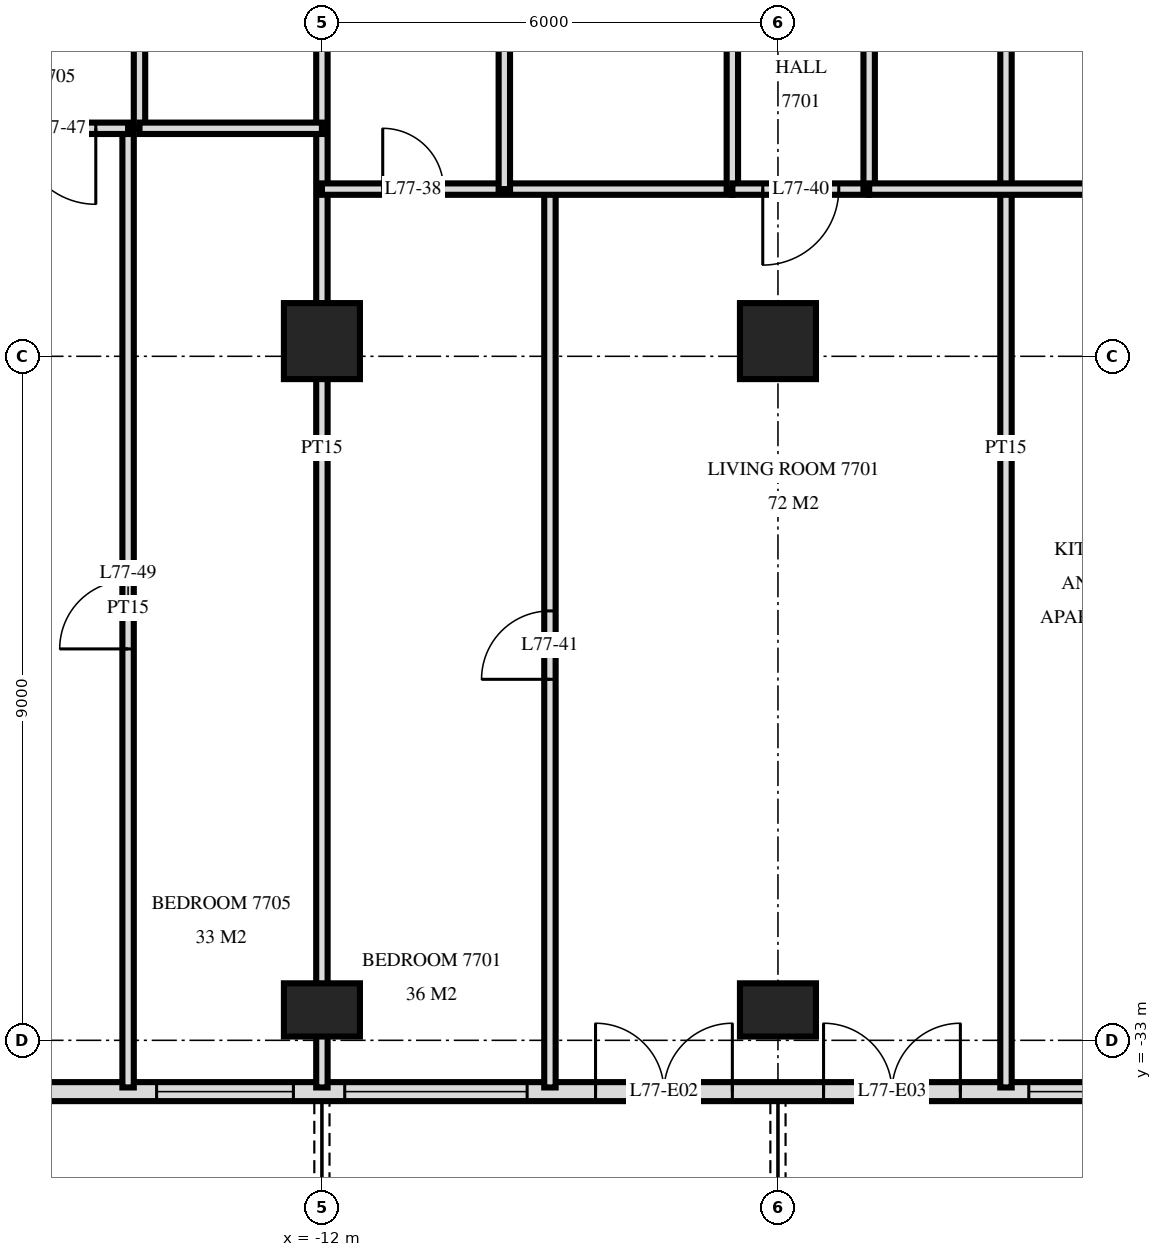
"""IFC4 building model, lengths in metres.
Left out: names, types, materials, properties, quantities, classifications, styles, units other than length and angle.
Written with IfcOpenShell. Run it as: python <this file> out.ifc"""

import sys

from ifc_helpers import new_model, si_unit, direction, frame, frame_2d, origin, origin_2d, place, context, subcontext, project, spatial, rectangle, extrude, element, fill, save


model = new_model("IFC4")
c1 = context("Model", 3, precision=1e-05, world=origin(), true_north=direction((0.0, 1.0)))
c2 = subcontext(c1, "Body", "Model", "MODEL_VIEW")
j1 = project(units=[si_unit("LENGTHUNIT", "METRE"), si_unit("PLANEANGLEUNIT", "RADIAN")], contexts=[c1])
p1 = place(None, origin())
s1 = spatial("IfcSite", under=j1, at=p1, CompositionType="ELEMENT")
p2 = place(p1, origin())
s2 = spatial("IfcBuilding", under=s1, at=p2, CompositionType="ELEMENT")
p3 = place(p2, frame((0.0, 0.0, 291.1)))
s3 = spatial("IfcBuildingStorey", under=s2, at=p3, CompositionType="ELEMENT", Elevation=291.1)
p4 = place(p3, frame((-12.0, -32.6, 0.0), z_axis=(0.0, 0.0, 1.0), x_axis=(1.0, 0.0, 0.0)))
e1 = element("IfcColumn", 1, at=p4, inside=s3, PredefinedType="COLUMN", context=c2, shape_type="SweptSolid", body=[
    extrude(rectangle(XDim=1.0, YDim=0.7, at=origin_2d()), origin(), (0.0, 0.0, 1.0), 3.5),
])
p5 = place(p3, frame((-12.0, -23.8, 0.0), z_axis=(0.0, 0.0, 1.0), x_axis=(1.0, 0.0, 0.0)))
e2 = element("IfcColumn", 2, at=p5, inside=s3, PredefinedType="COLUMN", context=c2, shape_type="SweptSolid", body=[
    extrude(rectangle(XDim=1.0, YDim=1.0, at=origin_2d()), origin(), (0.0, 0.0, 1.0), 3.5),
])
p6 = place(p3, frame((-6.0, -32.6, 0.0), z_axis=(0.0, 0.0, 1.0), x_axis=(1.0, 0.0, 0.0)))
e3 = element("IfcColumn", 3, at=p6, inside=s3, PredefinedType="COLUMN", context=c2, shape_type="SweptSolid", body=[
    extrude(rectangle(XDim=1.0, YDim=0.7, at=origin_2d()), origin(), (0.0, 0.0, 1.0), 3.5),
])
p7 = place(p3, frame((-6.0, -23.8, 0.0), z_axis=(0.0, 0.0, 1.0), x_axis=(1.0, 0.0, 0.0)))
e4 = element("IfcColumn", 4, at=p7, inside=s3, PredefinedType="COLUMN", context=c2, shape_type="SweptSolid", body=[
    extrude(rectangle(XDim=1.0, YDim=1.0, at=origin_2d()), origin(), (0.0, 0.0, 1.0), 3.5),
])
p8 = place(p3, frame((-18.575, -33.675, 0.0), z_axis=(0.0, 0.0, 1.0), x_axis=(1.0, 0.0, 0.0)))
e5 = element("IfcWall", 5, at=p8, inside=s3, PredefinedType="SOLIDWALL", context=c2, shape_type="SweptSolid", body=[
    extrude(rectangle(XDim=37.151, YDim=0.25, at=frame_2d((18.575, 0.0))), origin(), (0.0, 0.0, 1.0), 3.22),
])
p9 = place(p8, frame((1.175, 0.0, 0.0)))
e6 = element("IfcOpeningElement", 6, at=p9, cuts=e5, PredefinedType="OPENING", context=c2, shape_type="SweptSolid", body=[
    extrude(rectangle(XDim=1.8, YDim=2.4, at=frame_2d((0.9, 1.2))), frame((0.0, 0.135, 0.0), z_axis=(0.0, -1.0, 0.0), x_axis=(1.0, 0.0, 0.0)), (0.0, 0.0, 1.0), 0.27),
])
p10 = place(p8, frame((4.4, 0.0, 0.9)))
e7 = element("IfcOpeningElement", 7, at=p10, cuts=e5, PredefinedType="OPENING", context=c2, shape_type="SweptSolid", body=[
    extrude(rectangle(XDim=1.8, YDim=1.5, at=frame_2d((0.9, 0.75))), frame((0.0, 0.135, 0.0), z_axis=(0.0, -1.0, 0.0), x_axis=(1.0, 0.0, 0.0)), (0.0, 0.0, 1.0), 0.27),
])
p11 = place(p8, frame((6.875, 0.0, 0.9)))
e8 = element("IfcOpeningElement", 8, at=p11, cuts=e5, PredefinedType="OPENING", context=c2, shape_type="SweptSolid", body=[
    extrude(rectangle(XDim=2.4, YDim=1.5, at=frame_2d((1.2, 0.75))), frame((0.0, 0.135, 0.0), z_axis=(0.0, -1.0, 0.0), x_axis=(1.0, 0.0, 0.0)), (0.0, 0.0, 1.0), 0.27),
])
p12 = place(p8, frame((10.175, 0.0, 0.0)))
e9 = element("IfcOpeningElement", 9, at=p12, cuts=e5, PredefinedType="OPENING", context=c2, shape_type="SweptSolid", body=[
    extrude(rectangle(XDim=1.8, YDim=2.4, at=frame_2d((0.9, 1.2))), frame((0.0, 0.135, 0.0), z_axis=(0.0, -1.0, 0.0), x_axis=(1.0, 0.0, 0.0)), (0.0, 0.0, 1.0), 0.27),
])
p13 = place(p8, frame((13.175, 0.0, 0.0)))
e10 = element("IfcOpeningElement", 10, at=p13, cuts=e5, PredefinedType="OPENING", context=c2, shape_type="SweptSolid", body=[
    extrude(rectangle(XDim=1.8, YDim=2.4, at=frame_2d((0.9, 1.2))), frame((0.0, 0.135, 0.0), z_axis=(0.0, -1.0, 0.0), x_axis=(1.0, 0.0, 0.0)), (0.0, 0.0, 1.0), 0.27),
])
p14 = place(p8, frame((15.875, 0.0, 0.9)))
e11 = element("IfcOpeningElement", 11, at=p14, cuts=e5, PredefinedType="OPENING", context=c2, shape_type="SweptSolid", body=[
    extrude(rectangle(XDim=2.4, YDim=1.5, at=frame_2d((1.2, 0.75))), frame((0.0, 0.135, 0.0), z_axis=(0.0, -1.0, 0.0), x_axis=(1.0, 0.0, 0.0)), (0.0, 0.0, 1.0), 0.27),
])
p15 = place(p8, frame((19.175, 0.0, 0.0)))
e12 = element("IfcOpeningElement", 12, at=p15, cuts=e5, PredefinedType="OPENING", context=c2, shape_type="SweptSolid", body=[
    extrude(rectangle(XDim=1.8, YDim=2.4, at=frame_2d((0.9, 1.2))), frame((0.0, 0.135, 0.0), z_axis=(0.0, -1.0, 0.0), x_axis=(1.0, 0.0, 0.0)), (0.0, 0.0, 1.0), 0.27),
])
p16 = place(p8, frame((21.875, 0.0, 0.9)))
e13 = element("IfcOpeningElement", 13, at=p16, cuts=e5, PredefinedType="OPENING", context=c2, shape_type="SweptSolid", body=[
    extrude(rectangle(XDim=2.4, YDim=1.5, at=frame_2d((1.2, 0.75))), frame((0.0, 0.135, 0.0), z_axis=(0.0, -1.0, 0.0), x_axis=(1.0, 0.0, 0.0)), (0.0, 0.0, 1.0), 0.27),
])
p17 = place(p8, frame((25.063, 0.0, 0.9)))
e14 = element("IfcOpeningElement", 14, at=p17, cuts=e5, PredefinedType="OPENING", context=c2, shape_type="SweptSolid", body=[
    extrude(rectangle(XDim=1.8, YDim=1.5, at=frame_2d((0.9, 0.75))), frame((0.0, 0.135, 0.0), z_axis=(0.0, -1.0, 0.0), x_axis=(1.0, 0.0, 0.0)), (0.0, 0.0, 1.0), 0.27),
])
p18 = place(p8, frame((27.838, 0.0, 0.0)))
e15 = element("IfcOpeningElement", 15, at=p18, cuts=e5, PredefinedType="OPENING", context=c2, shape_type="SweptSolid", body=[
    extrude(rectangle(XDim=1.8, YDim=2.4, at=frame_2d((0.9, 1.2))), frame((0.0, 0.135, 0.0), z_axis=(0.0, -1.0, 0.0), x_axis=(1.0, 0.0, 0.0)), (0.0, 0.0, 1.0), 0.27),
])
p19 = place(p8, frame((31.175, 0.0, 0.0)))
e16 = element("IfcOpeningElement", 16, at=p19, cuts=e5, PredefinedType="OPENING", context=c2, shape_type="SweptSolid", body=[
    extrude(rectangle(XDim=1.8, YDim=2.4, at=frame_2d((0.9, 1.2))), frame((0.0, 0.135, 0.0), z_axis=(0.0, -1.0, 0.0), x_axis=(1.0, 0.0, 0.0)), (0.0, 0.0, 1.0), 0.27),
])
p20 = place(p3, frame((-3.0, -33.62, 0.0), z_axis=(0.0, 0.0, 1.0), x_axis=(0.0, 1.0, 0.0)))
e17 = element("IfcWall", 17, at=p20, inside=s3, PredefinedType="PARTITIONING", context=c2, shape_type="SweptSolid", body=[
    extrude(rectangle(XDim=16.82, YDim=0.15, at=frame_2d((8.41, 0.0))), origin(), (0.0, 0.0, 1.0), 3.22),
])
p21 = place(p3, frame((-4.8, -21.8, 0.0), z_axis=(0.0, 0.0, 1.0), x_axis=(0.0, 1.0, 0.0)))
e18 = element("IfcWall", 18, at=p21, inside=s3, PredefinedType="PARTITIONING", context=c2, shape_type="SweptSolid", body=[
    extrude(rectangle(XDim=5.0, YDim=0.15, at=frame_2d((2.5, 0.0))), origin(), (0.0, 0.0, 1.0), 3.22),
])
p22 = place(p3, frame((-6.6, -21.8, 0.0), z_axis=(0.0, 0.0, 1.0), x_axis=(0.0, 1.0, 0.0)))
e19 = element("IfcWall", 19, at=p22, inside=s3, PredefinedType="PARTITIONING", context=c2, shape_type="SweptSolid", body=[
    extrude(rectangle(XDim=5.0, YDim=0.15, at=frame_2d((2.5, 0.0))), origin(), (0.0, 0.0, 1.0), 3.22),
])
p23 = place(p22, frame((2.0, 0.0, 0.0)))
e20 = element("IfcOpeningElement", 20, at=p23, cuts=e19, PredefinedType="OPENING", context=c2, shape_type="SweptSolid", body=[
    extrude(rectangle(XDim=1.0, YDim=2.1, at=frame_2d((0.5, 1.05))), frame((0.0, 0.085, 0.0), z_axis=(0.0, -1.0, 0.0), x_axis=(1.0, 0.0, 0.0)), (0.0, 0.0, 1.0), 0.17),
])
p24 = place(p3, frame((-9.0, -33.62, 0.0), z_axis=(0.0, 0.0, 1.0), x_axis=(0.0, 1.0, 0.0)))
e21 = element("IfcWall", 21, at=p24, inside=s3, PredefinedType="PARTITIONING", context=c2, shape_type="SweptSolid", body=[
    extrude(rectangle(XDim=11.82, YDim=0.15, at=frame_2d((5.91, 0.0))), origin(), (0.0, 0.0, 1.0), 3.22),
])
p25 = place(p24, frame((5.37, 0.0, 0.0)))
e22 = element("IfcOpeningElement", 22, at=p25, cuts=e21, PredefinedType="OPENING", context=c2, shape_type="SweptSolid", body=[
    extrude(rectangle(XDim=0.9, YDim=2.1, at=frame_2d((0.45, 1.05))), frame((0.0, 0.085, 0.0), z_axis=(0.0, -1.0, 0.0), x_axis=(1.0, 0.0, 0.0)), (0.0, 0.0, 1.0), 0.17),
])
p26 = place(p3, frame((-9.6, -21.8, 0.0), z_axis=(0.0, 0.0, 1.0), x_axis=(0.0, 1.0, 0.0)))
e23 = element("IfcWall", 23, at=p26, inside=s3, PredefinedType="PARTITIONING", context=c2, shape_type="SweptSolid", body=[
    extrude(rectangle(XDim=5.0, YDim=0.15, at=frame_2d((2.5, 0.0))), origin(), (0.0, 0.0, 1.0), 3.22),
])
p27 = place(p3, frame((-12.0, -33.62, 0.0), z_axis=(0.0, 0.0, 1.0), x_axis=(0.0, 1.0, 0.0)))
e24 = element("IfcWall", 24, at=p27, inside=s3, PredefinedType="PARTITIONING", context=c2, shape_type="SweptSolid", body=[
    extrude(rectangle(XDim=16.82, YDim=0.15, at=frame_2d((8.41, 0.0))), origin(), (0.0, 0.0, 1.0), 3.22),
])
p28 = place(p3, frame((-14.4, -21.0, 0.0), z_axis=(0.0, 0.0, 1.0), x_axis=(0.0, 1.0, 0.0)))
e25 = element("IfcWall", 25, at=p28, inside=s3, PredefinedType="PARTITIONING", context=c2, shape_type="SweptSolid", body=[
    extrude(rectangle(XDim=4.2, YDim=0.15, at=frame_2d((2.1, 0.0))), origin(), (0.0, 0.0, 1.0), 3.22),
])
p29 = place(p28, frame((1.6, 0.0, 0.0)))
e26 = element("IfcOpeningElement", 26, at=p29, cuts=e25, PredefinedType="OPENING", context=c2, shape_type="SweptSolid", body=[
    extrude(rectangle(XDim=1.0, YDim=2.1, at=frame_2d((0.5, 1.05))), frame((0.0, 0.085, 0.0), z_axis=(0.0, -1.0, 0.0), x_axis=(1.0, 0.0, 0.0)), (0.0, 0.0, 1.0), 0.17),
])
p30 = place(p3, frame((-14.55, -33.62, 0.0), z_axis=(0.0, 0.0, 1.0), x_axis=(0.0, 1.0, 0.0)))
e27 = element("IfcWall", 27, at=p30, inside=s3, PredefinedType="PARTITIONING", context=c2, shape_type="SweptSolid", body=[
    extrude(rectangle(XDim=12.62, YDim=0.15, at=frame_2d((6.31, 0.0))), origin(), (0.0, 0.0, 1.0), 3.22),
])
p31 = place(p30, frame((5.77, 0.0, 0.0)))
e28 = element("IfcOpeningElement", 28, at=p31, cuts=e27, PredefinedType="OPENING", context=c2, shape_type="SweptSolid", body=[
    extrude(rectangle(XDim=0.9, YDim=2.1, at=frame_2d((0.45, 1.05))), frame((0.0, 0.085, 0.0), z_axis=(0.0, -1.0, 0.0), x_axis=(1.0, 0.0, 0.0)), (0.0, 0.0, 1.0), 0.17),
])
p32 = place(p3, frame((-6.6, -21.8, 0.0), z_axis=(0.0, 0.0, 1.0), x_axis=(1.0, 0.0, 0.0)))
e29 = element("IfcWall", 29, at=p32, inside=s3, PredefinedType="PARTITIONING", context=c2, shape_type="SweptSolid", body=[
    extrude(rectangle(XDim=1.8, YDim=0.15, at=frame_2d((0.9, 0.0))), origin(), (0.0, 0.0, 1.0), 3.22),
])
p33 = place(p32, frame((0.4, 0.0, 0.0)))
e30 = element("IfcOpeningElement", 30, at=p33, cuts=e29, PredefinedType="OPENING", context=c2, shape_type="SweptSolid", body=[
    extrude(rectangle(XDim=1.0, YDim=2.1, at=frame_2d((0.5, 1.05))), frame((0.0, 0.085, 0.0), z_axis=(0.0, -1.0, 0.0), x_axis=(1.0, 0.0, 0.0)), (0.0, 0.0, 1.0), 0.17),
])
p34 = place(p3, frame((-12.0, -21.8, 0.0), z_axis=(0.0, 0.0, 1.0), x_axis=(1.0, 0.0, 0.0)))
e31 = element("IfcWall", 31, at=p34, inside=s3, PredefinedType="PARTITIONING", context=c2, shape_type="SweptSolid", body=[
    extrude(rectangle(XDim=5.4, YDim=0.15, at=frame_2d((2.7, 0.0))), origin(), (0.0, 0.0, 1.0), 3.22),
])
p35 = place(p34, frame((0.8, 0.0, 0.0)))
e32 = element("IfcOpeningElement", 32, at=p35, cuts=e31, PredefinedType="OPENING", context=c2, shape_type="SweptSolid", body=[
    extrude(rectangle(XDim=0.8, YDim=2.1, at=frame_2d((0.4, 1.05))), frame((0.0, 0.085, 0.0), z_axis=(0.0, -1.0, 0.0), x_axis=(1.0, 0.0, 0.0)), (0.0, 0.0, 1.0), 0.17),
])
p36 = place(p3, frame((-4.8, -21.8, 0.0), z_axis=(0.0, 0.0, 1.0), x_axis=(1.0, 0.0, 0.0)))
e33 = element("IfcWall", 33, at=p36, inside=s3, PredefinedType="PARTITIONING", context=c2, shape_type="SweptSolid", body=[
    extrude(rectangle(XDim=3.5, YDim=0.15, at=frame_2d((1.75, 0.0))), origin(), (0.0, 0.0, 1.0), 3.22),
])
p37 = place(p3, frame((-16.4, -21.0, 0.0), z_axis=(0.0, 0.0, 1.0), x_axis=(1.0, 0.0, 0.0)))
e34 = element("IfcWall", 34, at=p37, inside=s3, PredefinedType="PARTITIONING", context=c2, shape_type="SweptSolid", body=[
    extrude(rectangle(XDim=1.85, YDim=0.15, at=frame_2d((0.925, 0.0))), origin(), (0.0, 0.0, 1.0), 3.22),
])
p38 = place(p37, frame((0.425, 0.0, 0.0)))
e35 = element("IfcOpeningElement", 35, at=p38, cuts=e34, PredefinedType="OPENING", context=c2, shape_type="SweptSolid", body=[
    extrude(rectangle(XDim=1.0, YDim=2.1, at=frame_2d((0.5, 1.05))), frame((0.0, 0.085, 0.0), z_axis=(0.0, -1.0, 0.0), x_axis=(1.0, 0.0, 0.0)), (0.0, 0.0, 1.0), 0.17),
])
p39 = place(p3, frame((-14.4, -21.0, 0.0), z_axis=(0.0, 0.0, 1.0), x_axis=(1.0, 0.0, 0.0)))
e36 = element("IfcWall", 36, at=p39, inside=s3, PredefinedType="PARTITIONING", context=c2, shape_type="SweptSolid", body=[
    extrude(rectangle(XDim=2.4, YDim=0.15, at=frame_2d((1.2, 0.0))), origin(), (0.0, 0.0, 1.0), 3.22),
])
p40 = place(p10, origin())
e37 = element("IfcWindow", 37, at=p40, inside=s3, PartitioningType="SINGLE_PANEL", PredefinedType="WINDOW", context=c2, shape_type="SweptSolid", body=[
    extrude(rectangle(XDim=1.8, YDim=1.5, at=frame_2d((0.9, 0.75))), frame((0.0, 0.03, 0.0), z_axis=(0.0, -1.0, 0.0), x_axis=(1.0, 0.0, 0.0)), (0.0, 0.0, 1.0), 0.06),
])
fill(e7, e37)
p41 = place(p11, origin())
e38 = element("IfcWindow", 38, at=p41, inside=s3, PartitioningType="SINGLE_PANEL", PredefinedType="WINDOW", context=c2, shape_type="SweptSolid", body=[
    extrude(rectangle(XDim=2.4, YDim=1.5, at=frame_2d((1.2, 0.75))), frame((0.0, 0.03, 0.0), z_axis=(0.0, -1.0, 0.0), x_axis=(1.0, 0.0, 0.0)), (0.0, 0.0, 1.0), 0.06),
])
fill(e8, e38)
p42 = place(p12, origin())
e39 = element("IfcDoor", 39, at=p42, inside=s3, OperationType="DOUBLE_DOOR_SINGLE_SWING", PredefinedType="DOOR", context=c2, shape_type="SweptSolid", body=[
    extrude(rectangle(XDim=1.8, YDim=2.4, at=frame_2d((0.9, 1.2))), frame((0.0, 0.025, 0.0), z_axis=(0.0, -1.0, 0.0), x_axis=(1.0, 0.0, 0.0)), (0.0, 0.0, 1.0), 0.05),
])
fill(e9, e39)
p43 = place(p13, origin())
e40 = element("IfcDoor", 40, at=p43, inside=s3, OperationType="DOUBLE_DOOR_SINGLE_SWING", PredefinedType="DOOR", context=c2, shape_type="SweptSolid", body=[
    extrude(rectangle(XDim=1.8, YDim=2.4, at=frame_2d((0.9, 1.2))), frame((0.0, 0.025, 0.0), z_axis=(0.0, -1.0, 0.0), x_axis=(1.0, 0.0, 0.0)), (0.0, 0.0, 1.0), 0.05),
])
fill(e10, e40)
p44 = place(p14, origin())
e41 = element("IfcWindow", 41, at=p44, inside=s3, PartitioningType="SINGLE_PANEL", PredefinedType="WINDOW", context=c2, shape_type="SweptSolid", body=[
    extrude(rectangle(XDim=2.4, YDim=1.5, at=frame_2d((1.2, 0.75))), frame((0.0, 0.03, 0.0), z_axis=(0.0, -1.0, 0.0), x_axis=(1.0, 0.0, 0.0)), (0.0, 0.0, 1.0), 0.06),
])
fill(e11, e41)
p45 = place(p35, origin())
e42 = element("IfcDoor", 42, at=p45, inside=s3, OperationType="SINGLE_SWING_RIGHT", PredefinedType="DOOR", context=c2, shape_type="SweptSolid", body=[
    extrude(rectangle(XDim=0.8, YDim=2.1, at=frame_2d((0.4, 1.05))), frame((0.0, 0.025, 0.0), z_axis=(0.0, -1.0, 0.0), x_axis=(1.0, 0.0, 0.0)), (0.0, 0.0, 1.0), 0.05),
])
fill(e32, e42)
p46 = place(p33, frame((0.5, 0.0, 0.0), z_axis=(0.0, 0.0, 1.0), x_axis=(-1.0, 0.0, 0.0)))
e43 = element("IfcDoor", 43, at=p46, inside=s3, OperationType="SINGLE_SWING_LEFT", PredefinedType="DOOR", context=c2, shape_type="SweptSolid", body=[
    extrude(rectangle(XDim=1.0, YDim=2.1, at=frame_2d((0.0, 1.05))), frame((0.0, -0.025, 0.0), z_axis=(0.0, 1.0, 0.0), x_axis=(-1.0, 0.0, 0.0)), (0.0, 0.0, 1.0), 0.05),
])
fill(e30, e43)
p47 = place(p25, origin())
e44 = element("IfcDoor", 44, at=p47, inside=s3, OperationType="SINGLE_SWING_RIGHT", PredefinedType="DOOR", context=c2, shape_type="SweptSolid", body=[
    extrude(rectangle(XDim=0.9, YDim=2.1, at=frame_2d((0.45, 1.05))), frame((0.0, 0.025, 0.0), z_axis=(0.0, -1.0, 0.0), x_axis=(1.0, 0.0, 0.0)), (0.0, 0.0, 1.0), 0.05),
])
fill(e22, e44)
p48 = place(p38, frame((0.5, 0.0, 0.0), z_axis=(0.0, 0.0, 1.0), x_axis=(-1.0, 0.0, 0.0)))
e45 = element("IfcDoor", 45, at=p48, inside=s3, OperationType="SINGLE_SWING_RIGHT", PredefinedType="DOOR", context=c2, shape_type="SweptSolid", body=[
    extrude(rectangle(XDim=1.0, YDim=2.1, at=frame_2d((0.0, 1.05))), frame((0.0, -0.025, 0.0), z_axis=(0.0, 1.0, 0.0), x_axis=(-1.0, 0.0, 0.0)), (0.0, 0.0, 1.0), 0.05),
])
fill(e35, e45)
p49 = place(p31, origin())
e46 = element("IfcDoor", 46, at=p49, inside=s3, OperationType="SINGLE_SWING_RIGHT", PredefinedType="DOOR", context=c2, shape_type="SweptSolid", body=[
    extrude(rectangle(XDim=0.9, YDim=2.1, at=frame_2d((0.45, 1.05))), frame((0.0, 0.025, 0.0), z_axis=(0.0, -1.0, 0.0), x_axis=(1.0, 0.0, 0.0)), (0.0, 0.0, 1.0), 0.05),
])
fill(e28, e46)
save(model, sys.argv[1])
